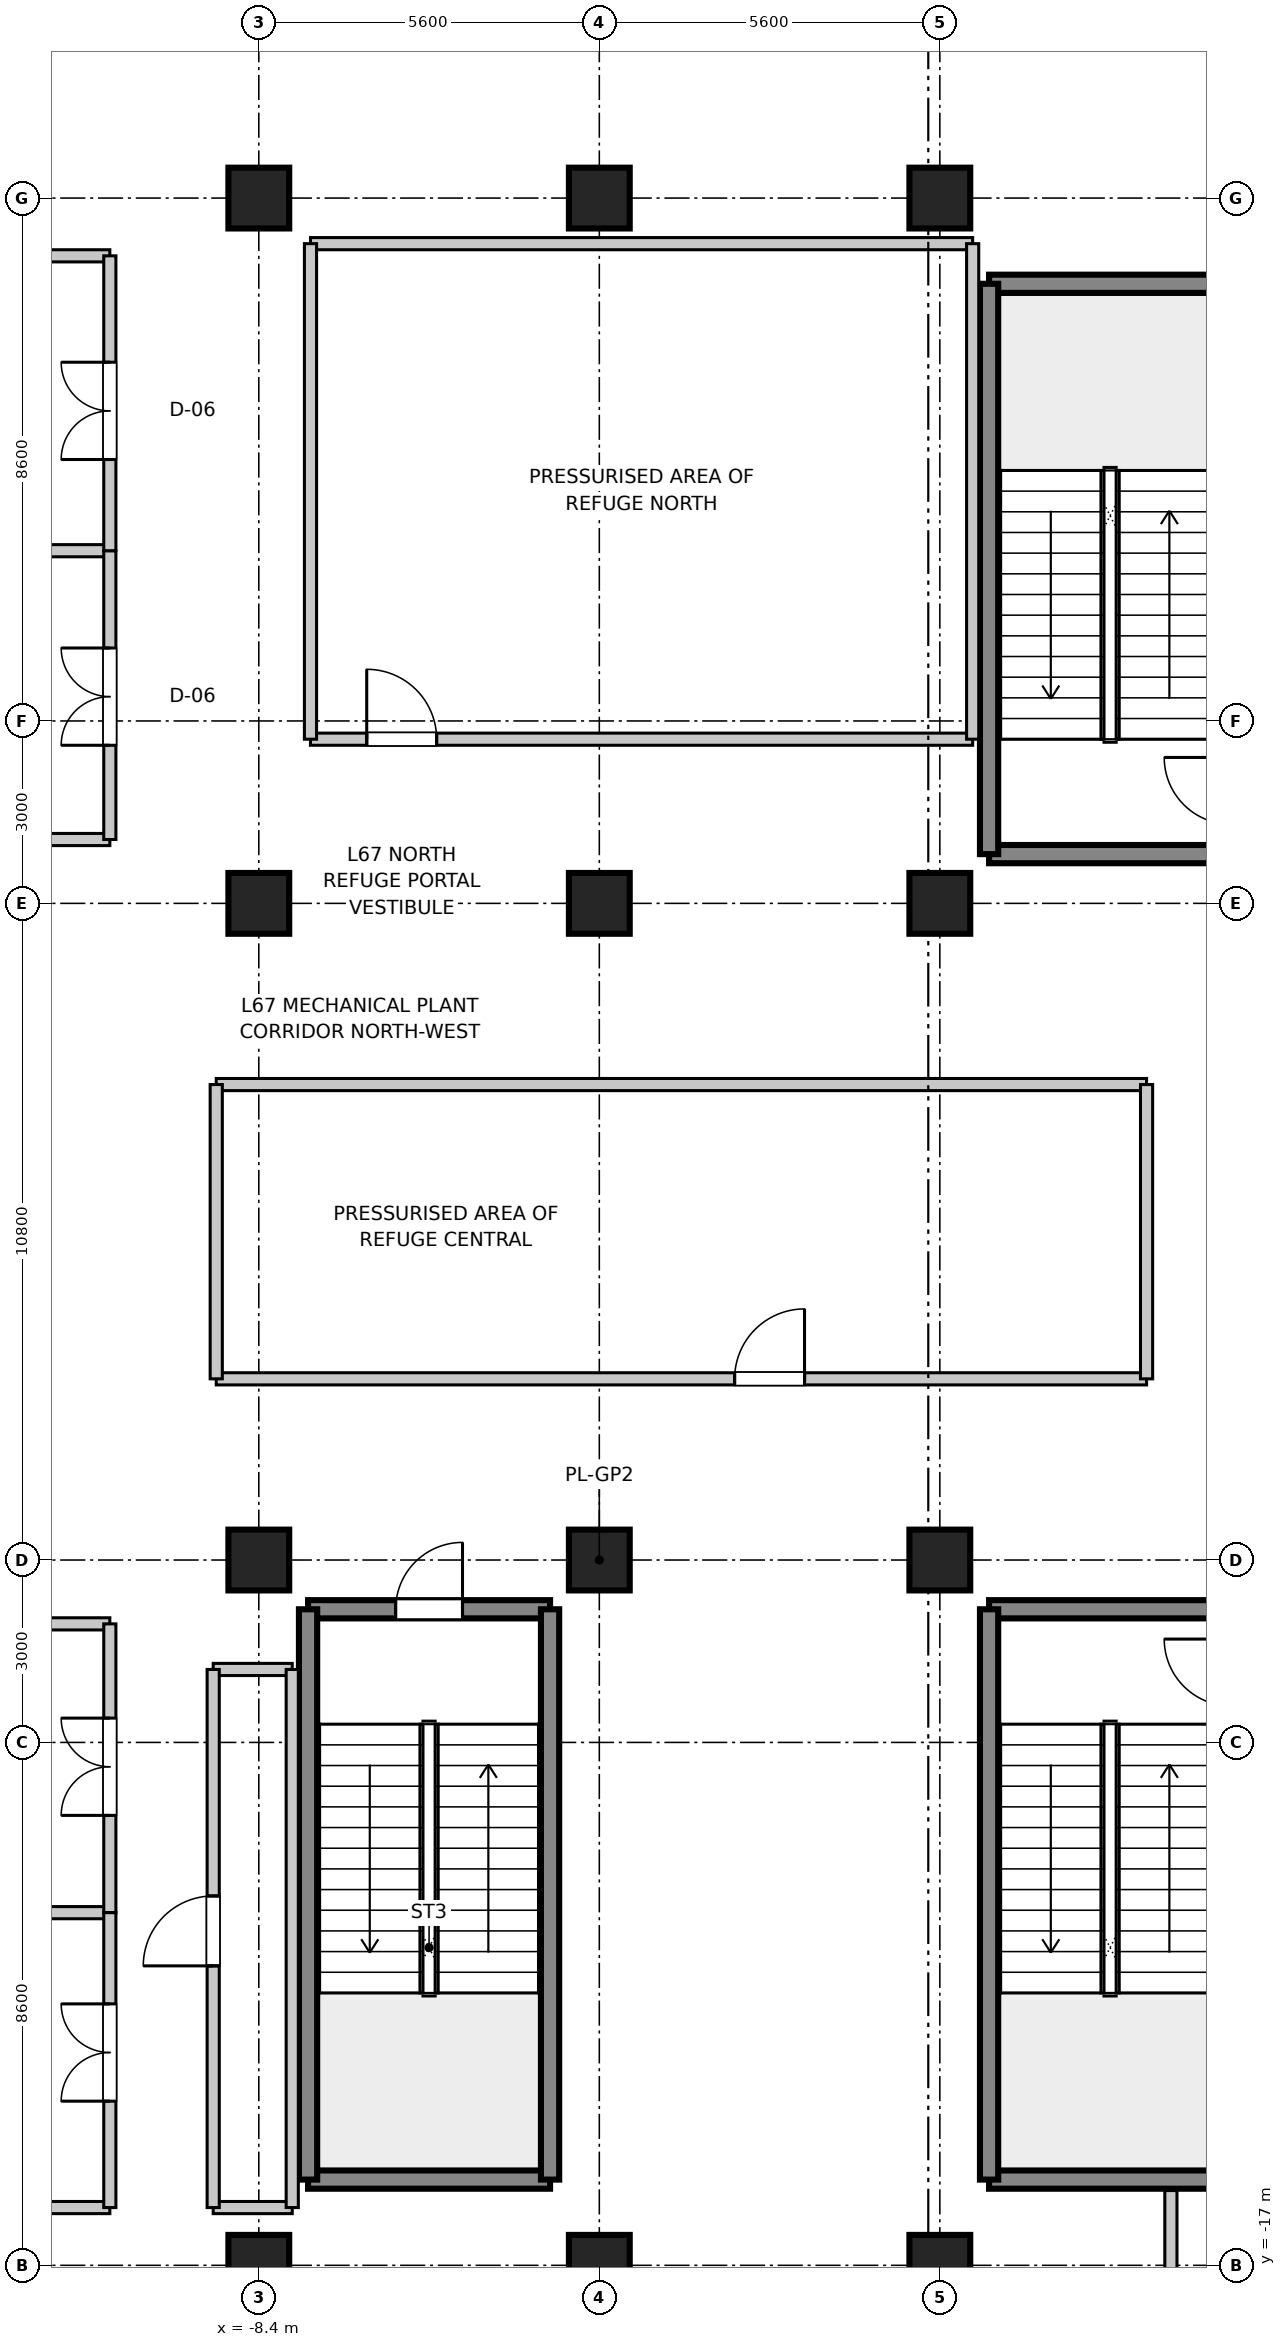
"""IFC4 building model, lengths in metres.
Left out: names, types, materials, properties, quantities, classifications, styles, units other than length and angle.
Written with IfcOpenShell. Run it as: python <this file> out.ifc"""

import sys

from ifc_helpers import new_model, si_unit, direction, frame, frame_2d, origin, origin_2d, place, context, subcontext, project, spatial, rectangle, extrude, source, transform, mapped, element, fill, save


model = new_model("IFC4")
c1 = context("Model", 3, precision=1e-05, world=origin(), true_north=direction((0.0, 1.0)))
c2 = subcontext(c1, "Body", "Model", "MODEL_VIEW")
j1 = project(units=[si_unit("LENGTHUNIT", "METRE"), si_unit("PLANEANGLEUNIT", "RADIAN")], contexts=[c1])
p1 = place(None, origin())
s1 = spatial("IfcSite", under=j1, at=p1, CompositionType="ELEMENT")
p2 = place(p1, origin())
s2 = spatial("IfcBuilding", under=s1, at=p2, CompositionType="ELEMENT")
p3 = place(p2, frame((0.0, 0.0, 261.5)))
s3 = spatial("IfcBuildingStorey", under=s2, at=p3, CompositionType="ELEMENT", Elevation=261.5)
m1 = source(origin(), c2, "Body", "SweptSolid", [
    extrude(rectangle(XDim=1.0, YDim=1.0, at=origin_2d()), origin(), (0.0, 0.0, 1.0), 4.755),
])
for number, where, z_axis, x_axis in (
    (1, (-8.4, -17.0, 0.0), (0.0, 0.0, 1.0), (1.0, 0.0, 0.0)),
    (2, (-8.4, -5.4, 0.0), (0.0, 0.0, 1.0), (1.0, 0.0, 0.0)),
    (3, (-8.4, 5.4, 0.0), (0.0, 0.0, 1.0), (1.0, 0.0, 0.0)),
    (4, (-8.4, 17.0, 0.0), (0.0, 0.0, 1.0), (1.0, 0.0, 0.0)),
    (5, (-2.8, -17.0, 0.0), (0.0, 0.0, 1.0), (1.0, 0.0, 0.0)),
    (6, (-2.8, -5.4, 0.0), (0.0, 0.0, 1.0), (1.0, 0.0, 0.0)),
    (7, (-2.8, 5.4, 0.0), (0.0, 0.0, 1.0), (1.0, 0.0, 0.0)),
    (8, (-2.8, 17.0, 0.0), (0.0, 0.0, 1.0), (1.0, 0.0, 0.0)),
    (9, (2.8, -17.0, 0.0), (0.0, 0.0, 1.0), (1.0, 0.0, 0.0)),
    (10, (2.8, -5.4, 0.0), (0.0, 0.0, 1.0), (1.0, 0.0, 0.0)),
    (11, (2.8, 5.4, 0.0), (0.0, 0.0, 1.0), (1.0, 0.0, 0.0)),
    (12, (2.8, 17.0, 0.0), (0.0, 0.0, 1.0), (1.0, 0.0, 0.0)),
):
    element("IfcColumn", number, at=place(p3, frame(where, z_axis=z_axis, x_axis=x_axis)), inside=s3, PredefinedType="COLUMN", context=c2, shape_type="MappedRepresentation", body=[
        mapped(m1, transform((0.0, 0.0, 0.0), scale=1.0)),
    ])
m2 = source(origin(), c2, "Body", "SweptSolid", [
    extrude(rectangle(XDim=3.98, YDim=0.3, at=frame_2d((1.99, 0.0))), origin(), (0.0, 0.0, 1.0), 4.5),
])
for number, where, z_axis, x_axis in (
    (13, (3.61, 6.21, 0.0), (0.0, 0.0, 1.0), (1.0, 0.0, 0.0)),
    (14, (3.61, 15.59, 0.0), (0.0, 0.0, 1.0), (1.0, 0.0, 0.0)),
):
    element("IfcWall", number, at=place(p3, frame(where, z_axis=z_axis, x_axis=x_axis)), inside=s3, PredefinedType="SHEAR", context=c2, shape_type="MappedRepresentation", body=[
        mapped(m2, transform((0.0, 0.0, 0.0), scale=1.0)),
    ])
m3 = source(origin(), c2, "Body", "SweptSolid", [
    extrude(rectangle(XDim=9.38, YDim=0.3, at=frame_2d((4.69, 0.0))), origin(), (0.0, 0.0, 1.0), 4.5),
])
p4 = place(p3, frame((3.61, 6.21, 0.0), z_axis=(0.0, 0.0, 1.0), x_axis=(0.0, 1.0, 0.0)))
e15 = element("IfcWall", 15, at=p4, inside=s3, PredefinedType="SHEAR", context=c2, shape_type="MappedRepresentation", body=[
    mapped(m3, transform((0.0, 0.0, 0.0), scale=1.0)),
])
for number, where, z_axis, x_axis in (
    (16, (3.61, -15.59, 0.0), (0.0, 0.0, 1.0), (1.0, 0.0, 0.0)),
    (17, (3.61, -6.21, 0.0), (0.0, 0.0, 1.0), (1.0, 0.0, 0.0)),
):
    element("IfcWall", number, at=place(p3, frame(where, z_axis=z_axis, x_axis=x_axis)), inside=s3, PredefinedType="SHEAR", context=c2, shape_type="MappedRepresentation", body=[
        mapped(m2, transform((0.0, 0.0, 0.0), scale=1.0)),
    ])
p5 = place(p3, frame((3.61, -15.59, 0.0), z_axis=(0.0, 0.0, 1.0), x_axis=(0.0, 1.0, 0.0)))
e18 = element("IfcWall", 18, at=p5, inside=s3, PredefinedType="SHEAR", context=c2, shape_type="MappedRepresentation", body=[
    mapped(m3, transform((0.0, 0.0, 0.0), scale=1.0)),
])
p6 = place(p3, frame((-7.59, -15.59, 0.0), z_axis=(0.0, 0.0, 1.0), x_axis=(1.0, 0.0, 0.0)))
e19 = element("IfcWall", 19, at=p6, inside=s3, PredefinedType="SHEAR", context=c2, shape_type="MappedRepresentation", body=[
    mapped(m2, transform((0.0, 0.0, 0.0), scale=1.0)),
])
p7 = place(p3, frame((-7.59, -6.21, 0.0), z_axis=(0.0, 0.0, 1.0), x_axis=(1.0, 0.0, 0.0)))
e20 = element("IfcWall", 20, at=p7, inside=s3, PredefinedType="SHEAR", context=c2, shape_type="MappedRepresentation", body=[
    mapped(m2, transform((0.0, 0.0, 0.0), scale=1.0)),
])
p8 = place(p7, frame((1.44, 0.0, 0.0)))
e21 = element("IfcOpeningElement", 21, at=p8, cuts=e20, PredefinedType="OPENING", context=c2, shape_type="SweptSolid", body=[
    extrude(rectangle(XDim=1.1, YDim=2.15, at=frame_2d((0.55, 1.075))), frame((0.0, 0.16, 0.0), z_axis=(0.0, -1.0, 0.0), x_axis=(1.0, 0.0, 0.0)), (0.0, 0.0, 1.0), 0.32),
])
for number, where, z_axis, x_axis in (
    (22, (-7.59, -15.59, 0.0), (0.0, 0.0, 1.0), (0.0, 1.0, 0.0)),
    (23, (-3.61, -15.59, 0.0), (0.0, 0.0, 1.0), (0.0, 1.0, 0.0)),
):
    element("IfcWall", number, at=place(p3, frame(where, z_axis=z_axis, x_axis=x_axis)), inside=s3, PredefinedType="SHEAR", context=c2, shape_type="MappedRepresentation", body=[
        mapped(m3, transform((0.0, 0.0, 0.0), scale=1.0)),
    ])
m4 = source(origin(), c2, "Body", "SweptSolid", [
    extrude(rectangle(XDim=4.03, YDim=0.2, at=frame_2d((2.015, 0.0))), origin(), (0.0, 0.0, 1.0), 3.4),
])
p9 = place(p3, frame((6.6, -19.8, 0.0), z_axis=(0.0, 0.0, 1.0), x_axis=(0.0, 1.0, 0.0)))
e24 = element("IfcWall", 24, at=p9, inside=s3, PredefinedType="PARTITIONING", context=c2, shape_type="MappedRepresentation", body=[
    mapped(m4, transform((0.0, 0.0, 0.0), scale=1.0)),
])
m5 = source(origin(), c2, "Body", "SweptSolid", [
    extrude(rectangle(XDim=10.89, YDim=0.2, at=frame_2d((5.445, 0.0))), origin(), (0.0, 0.0, 1.0), 3.4),
])
p10 = place(p3, frame((-7.55, 8.1, 0.0), z_axis=(0.0, 0.0, 1.0), x_axis=(1.0, 0.0, 0.0)))
e25 = element("IfcWall", 25, at=p10, inside=s3, PredefinedType="PARTITIONING", context=c2, shape_type="MappedRepresentation", body=[
    mapped(m5, transform((0.0, 0.0, 0.0), scale=1.0)),
])
p11 = place(p10, frame((0.925, 0.0, 0.0)))
e26 = element("IfcOpeningElement", 26, at=p11, cuts=e25, PredefinedType="OPENING", context=c2, shape_type="SweptSolid", body=[
    extrude(rectangle(XDim=1.15, YDim=2.15, at=frame_2d((0.575, 1.075))), frame((0.0, 0.11, 0.0), z_axis=(0.0, -1.0, 0.0), x_axis=(1.0, 0.0, 0.0)), (0.0, 0.0, 1.0), 0.22),
])
p12 = place(p3, frame((-7.55, 16.25, 0.0), z_axis=(0.0, 0.0, 1.0), x_axis=(1.0, 0.0, 0.0)))
e27 = element("IfcWall", 27, at=p12, inside=s3, PredefinedType="PARTITIONING", context=c2, shape_type="MappedRepresentation", body=[
    mapped(m5, transform((0.0, 0.0, 0.0), scale=1.0)),
])
m6 = source(origin(), c2, "Body", "SweptSolid", [
    extrude(rectangle(XDim=8.15, YDim=0.2, at=frame_2d((4.075, 0.0))), origin(), (0.0, 0.0, 1.0), 3.4),
])
for number, where, z_axis, x_axis in (
    (28, (-7.55, 8.1, 0.0), (0.0, 0.0, 1.0), (0.0, 1.0, 0.0)),
    (29, (3.34, 8.1, 0.0), (0.0, 0.0, 1.0), (0.0, 1.0, 0.0)),
):
    element("IfcWall", number, at=place(p3, frame(where, z_axis=z_axis, x_axis=x_axis)), inside=s3, PredefinedType="PARTITIONING", context=c2, shape_type="MappedRepresentation", body=[
        mapped(m6, transform((0.0, 0.0, 0.0), scale=1.0)),
    ])
m7 = source(origin(), c2, "Body", "SweptSolid", [
    extrude(rectangle(XDim=15.3, YDim=0.2, at=frame_2d((7.65, 0.0))), origin(), (0.0, 0.0, 1.0), 3.4),
])
p13 = place(p3, frame((-9.1, -2.42, 0.0), z_axis=(0.0, 0.0, 1.0), x_axis=(1.0, 0.0, 0.0)))
e30 = element("IfcWall", 30, at=p13, inside=s3, PredefinedType="PARTITIONING", context=c2, shape_type="MappedRepresentation", body=[
    mapped(m7, transform((0.0, 0.0, 0.0), scale=1.0)),
])
p14 = place(p13, frame((8.525, 0.0, 0.0)))
e31 = element("IfcOpeningElement", 31, at=p14, cuts=e30, PredefinedType="OPENING", context=c2, shape_type="SweptSolid", body=[
    extrude(rectangle(XDim=1.15, YDim=2.15, at=frame_2d((0.575, 1.075))), frame((0.0, 0.11, 0.0), z_axis=(0.0, -1.0, 0.0), x_axis=(1.0, 0.0, 0.0)), (0.0, 0.0, 1.0), 0.22),
])
p15 = place(p3, frame((-9.1, 2.42, 0.0), z_axis=(0.0, 0.0, 1.0), x_axis=(1.0, 0.0, 0.0)))
e32 = element("IfcWall", 32, at=p15, inside=s3, PredefinedType="PARTITIONING", context=c2, shape_type="MappedRepresentation", body=[
    mapped(m7, transform((0.0, 0.0, 0.0), scale=1.0)),
])
m8 = source(origin(), c2, "Body", "SweptSolid", [
    extrude(rectangle(XDim=4.84, YDim=0.2, at=frame_2d((2.42, 0.0))), origin(), (0.0, 0.0, 1.0), 3.4),
])
for number, where, z_axis, x_axis in (
    (33, (-9.1, -2.42, 0.0), (0.0, 0.0, 1.0), (0.0, 1.0, 0.0)),
    (34, (6.2, -2.42, 0.0), (0.0, 0.0, 1.0), (0.0, 1.0, 0.0)),
):
    element("IfcWall", number, at=place(p3, frame(where, z_axis=z_axis, x_axis=x_axis)), inside=s3, PredefinedType="PARTITIONING", context=c2, shape_type="MappedRepresentation", body=[
        mapped(m8, transform((0.0, 0.0, 0.0), scale=1.0)),
    ])
m9 = source(origin(), c2, "Body", "SweptSolid", [
    extrude(rectangle(XDim=1.3, YDim=0.2, at=frame_2d((0.65, 0.0))), origin(), (0.0, 0.0, 1.0), 3.4),
])
for number, where, z_axis, x_axis in (
    (35, (-9.15, -16.05, 0.0), (0.0, 0.0, 1.0), (1.0, 0.0, 0.0)),
    (36, (-9.15, -7.2, 0.0), (0.0, 0.0, 1.0), (1.0, 0.0, 0.0)),
):
    element("IfcWall", number, at=place(p3, frame(where, z_axis=z_axis, x_axis=x_axis)), inside=s3, PredefinedType="PARTITIONING", context=c2, shape_type="MappedRepresentation", body=[
        mapped(m9, transform((0.0, 0.0, 0.0), scale=1.0)),
    ])
m10 = source(origin(), c2, "Body", "SweptSolid", [
    extrude(rectangle(XDim=8.85, YDim=0.2, at=frame_2d((4.425, 0.0))), origin(), (0.0, 0.0, 1.0), 3.4),
])
p16 = place(p3, frame((-9.15, -16.05, 0.0), z_axis=(0.0, 0.0, 1.0), x_axis=(0.0, 1.0, 0.0)))
e37 = element("IfcWall", 37, at=p16, inside=s3, PredefinedType="PARTITIONING", context=c2, shape_type="MappedRepresentation", body=[
    mapped(m10, transform((0.0, 0.0, 0.0), scale=1.0)),
])
p17 = place(p16, frame((3.975, 0.0, 0.0)))
e38 = element("IfcOpeningElement", 38, at=p17, cuts=e37, PredefinedType="OPENING", context=c2, shape_type="SweptSolid", body=[
    extrude(rectangle(XDim=1.15, YDim=2.15, at=frame_2d((0.575, 1.075))), frame((0.0, 0.11, 0.0), z_axis=(0.0, -1.0, 0.0), x_axis=(1.0, 0.0, 0.0)), (0.0, 0.0, 1.0), 0.22),
])
p18 = place(p3, frame((-7.85, -16.05, 0.0), z_axis=(0.0, 0.0, 1.0), x_axis=(0.0, 1.0, 0.0)))
e39 = element("IfcWall", 39, at=p18, inside=s3, PredefinedType="PARTITIONING", context=c2, shape_type="MappedRepresentation", body=[
    mapped(m10, transform((0.0, 0.0, 0.0), scale=1.0)),
])
m11 = source(origin(), c2, "Body", "SweptSolid", [
    extrude(rectangle(XDim=12.07, YDim=0.2, at=frame_2d((6.035, 0.0))), origin(), (0.0, 0.0, 1.0), 3.4),
])
for number, where, z_axis, x_axis in (
    (40, (-22.92, 6.45, 0.0), (0.0, 0.0, 1.0), (1.0, 0.0, 0.0)),
    (41, (-22.92, 11.2, 0.0), (0.0, 0.0, 1.0), (1.0, 0.0, 0.0)),
):
    element("IfcWall", number, at=place(p3, frame(where, z_axis=z_axis, x_axis=x_axis)), inside=s3, PredefinedType="PARTITIONING", context=c2, shape_type="MappedRepresentation", body=[
        mapped(m11, transform((0.0, 0.0, 0.0), scale=1.0)),
    ])
m12 = source(origin(), c2, "Body", "SweptSolid", [
    extrude(rectangle(XDim=4.75, YDim=0.2, at=frame_2d((2.375, 0.0))), origin(), (0.0, 0.0, 1.0), 3.4),
])
p19 = place(p3, frame((-10.85, 6.45, 0.0), z_axis=(0.0, 0.0, 1.0), x_axis=(0.0, 1.0, 0.0)))
e42 = element("IfcWall", 42, at=p19, inside=s3, PredefinedType="PARTITIONING", context=c2, shape_type="MappedRepresentation", body=[
    mapped(m12, transform((0.0, 0.0, 0.0), scale=1.0)),
])
p20 = place(p19, frame((1.55, 0.0, 0.0)))
e43 = element("IfcOpeningElement", 43, at=p20, cuts=e42, PredefinedType="OPENING", context=c2, shape_type="SweptSolid", body=[
    extrude(rectangle(XDim=1.6, YDim=2.15, at=frame_2d((0.8, 1.075))), frame((0.0, 0.11, 0.0), z_axis=(0.0, -1.0, 0.0), x_axis=(1.0, 0.0, 0.0)), (0.0, 0.0, 1.0), 0.22),
])
p21 = place(p3, frame((-22.92, 16.05, 0.0), z_axis=(0.0, 0.0, 1.0), x_axis=(1.0, 0.0, 0.0)))
e44 = element("IfcWall", 44, at=p21, inside=s3, PredefinedType="PARTITIONING", context=c2, shape_type="MappedRepresentation", body=[
    mapped(m11, transform((0.0, 0.0, 0.0), scale=1.0)),
])
m13 = source(origin(), c2, "Body", "SweptSolid", [
    extrude(rectangle(XDim=4.85, YDim=0.2, at=frame_2d((2.425, 0.0))), origin(), (0.0, 0.0, 1.0), 3.4),
])
p22 = place(p3, frame((-10.85, 11.2, 0.0), z_axis=(0.0, 0.0, 1.0), x_axis=(0.0, 1.0, 0.0)))
e45 = element("IfcWall", 45, at=p22, inside=s3, PredefinedType="PARTITIONING", context=c2, shape_type="MappedRepresentation", body=[
    mapped(m13, transform((0.0, 0.0, 0.0), scale=1.0)),
])
p23 = place(p22, frame((1.5, 0.0, 0.0)))
e46 = element("IfcOpeningElement", 46, at=p23, cuts=e45, PredefinedType="OPENING", context=c2, shape_type="SweptSolid", body=[
    extrude(rectangle(XDim=1.6, YDim=2.15, at=frame_2d((0.8, 1.075))), frame((0.0, 0.11, 0.0), z_axis=(0.0, -1.0, 0.0), x_axis=(1.0, 0.0, 0.0)), (0.0, 0.0, 1.0), 0.22),
])
for number, where, z_axis, x_axis in (
    (47, (-22.92, -11.2, 0.0), (0.0, 0.0, 1.0), (1.0, 0.0, 0.0)),
    (48, (-22.92, -6.45, 0.0), (0.0, 0.0, 1.0), (1.0, 0.0, 0.0)),
):
    element("IfcWall", number, at=place(p3, frame(where, z_axis=z_axis, x_axis=x_axis)), inside=s3, PredefinedType="PARTITIONING", context=c2, shape_type="MappedRepresentation", body=[
        mapped(m11, transform((0.0, 0.0, 0.0), scale=1.0)),
    ])
p24 = place(p3, frame((-10.85, -11.2, 0.0), z_axis=(0.0, 0.0, 1.0), x_axis=(0.0, 1.0, 0.0)))
e49 = element("IfcWall", 49, at=p24, inside=s3, PredefinedType="PARTITIONING", context=c2, shape_type="MappedRepresentation", body=[
    mapped(m12, transform((0.0, 0.0, 0.0), scale=1.0)),
])
p25 = place(p24, frame((1.6, 0.0, 0.0)))
e50 = element("IfcOpeningElement", 50, at=p25, cuts=e49, PredefinedType="OPENING", context=c2, shape_type="SweptSolid", body=[
    extrude(rectangle(XDim=1.6, YDim=2.15, at=frame_2d((0.8, 1.075))), frame((0.0, 0.11, 0.0), z_axis=(0.0, -1.0, 0.0), x_axis=(1.0, 0.0, 0.0)), (0.0, 0.0, 1.0), 0.22),
])
p26 = place(p3, frame((-22.92, -16.05, 0.0), z_axis=(0.0, 0.0, 1.0), x_axis=(1.0, 0.0, 0.0)))
e51 = element("IfcWall", 51, at=p26, inside=s3, PredefinedType="PARTITIONING", context=c2, shape_type="MappedRepresentation", body=[
    mapped(m11, transform((0.0, 0.0, 0.0), scale=1.0)),
])
p27 = place(p3, frame((-10.85, -16.05, 0.0), z_axis=(0.0, 0.0, 1.0), x_axis=(0.0, 1.0, 0.0)))
e52 = element("IfcWall", 52, at=p27, inside=s3, PredefinedType="PARTITIONING", context=c2, shape_type="MappedRepresentation", body=[
    mapped(m13, transform((0.0, 0.0, 0.0), scale=1.0)),
])
p28 = place(p27, frame((1.75, 0.0, 0.0)))
e53 = element("IfcOpeningElement", 53, at=p28, cuts=e52, PredefinedType="OPENING", context=c2, shape_type="SweptSolid", body=[
    extrude(rectangle(XDim=1.6, YDim=2.15, at=frame_2d((0.8, 1.075))), frame((0.0, 0.11, 0.0), z_axis=(0.0, -1.0, 0.0), x_axis=(1.0, 0.0, 0.0)), (0.0, 0.0, 1.0), 0.22),
])
m14 = source(origin(), c2, "Body", "SweptSolid", [
    extrude(rectangle(XDim=1.1, YDim=2.15, at=frame_2d((0.55, 1.075))), frame((0.0, 0.025, 0.0), z_axis=(0.0, -1.0, 0.0), x_axis=(1.0, 0.0, 0.0)), (0.0, 0.0, 1.0), 0.05),
])
p29 = place(p8, frame((1.1, 0.0, 0.0), z_axis=(0.0, 0.0, 1.0), x_axis=(-1.0, 0.0, 0.0)))
e54 = element("IfcDoor", 54, at=p29, inside=s3, OperationType="SINGLE_SWING_RIGHT", PredefinedType="DOOR", context=c2, shape_type="MappedRepresentation", body=[
    mapped(m14, transform((0.0, 0.0, 0.0), scale=1.0)),
])
fill(e21, e54)
m15 = source(origin(), c2, "Body", "SweptSolid", [
    extrude(rectangle(XDim=1.15, YDim=2.15, at=frame_2d((0.575, 1.075))), frame((0.0, 0.025, 0.0), z_axis=(0.0, -1.0, 0.0), x_axis=(1.0, 0.0, 0.0)), (0.0, 0.0, 1.0), 0.05),
])
p30 = place(p11, origin())
e55 = element("IfcDoor", 55, at=p30, inside=s3, OperationType="SINGLE_SWING_LEFT", PredefinedType="DOOR", context=c2, shape_type="MappedRepresentation", body=[
    mapped(m15, transform((0.0, 0.0, 0.0), scale=1.0)),
])
fill(e26, e55)
p31 = place(p14, origin())
e56 = element("IfcDoor", 56, at=p31, inside=s3, OperationType="SINGLE_SWING_RIGHT", PredefinedType="DOOR", context=c2, shape_type="MappedRepresentation", body=[
    mapped(m15, transform((0.0, 0.0, 0.0), scale=1.0)),
])
fill(e31, e56)
p32 = place(p17, frame((1.15, 0.0, 0.0), z_axis=(0.0, 0.0, 1.0), x_axis=(-1.0, 0.0, 0.0)))
e57 = element("IfcDoor", 57, at=p32, inside=s3, OperationType="SINGLE_SWING_LEFT", PredefinedType="DOOR", context=c2, shape_type="MappedRepresentation", body=[
    mapped(m15, transform((0.0, 0.0, 0.0), scale=1.0)),
])
fill(e38, e57)
m16 = source(origin(), c2, "Body", "SweptSolid", [
    extrude(rectangle(XDim=1.6, YDim=2.15, at=frame_2d((0.8, 1.075))), frame((0.0, 0.025, 0.0), z_axis=(0.0, -1.0, 0.0), x_axis=(1.0, 0.0, 0.0)), (0.0, 0.0, 1.0), 0.05),
])
p33 = place(p20, origin())
e58 = element("IfcDoor", 58, at=p33, inside=s3, OperationType="DOUBLE_DOOR_SINGLE_SWING", PredefinedType="DOOR", context=c2, shape_type="MappedRepresentation", body=[
    mapped(m16, transform((0.0, 0.0, 0.0), scale=1.0)),
])
fill(e43, e58)
p34 = place(p23, origin())
e59 = element("IfcDoor", 59, at=p34, inside=s3, OperationType="DOUBLE_DOOR_SINGLE_SWING", PredefinedType="DOOR", context=c2, shape_type="MappedRepresentation", body=[
    mapped(m16, transform((0.0, 0.0, 0.0), scale=1.0)),
])
fill(e46, e59)
p35 = place(p25, origin())
e60 = element("IfcDoor", 60, at=p35, inside=s3, OperationType="DOUBLE_DOOR_SINGLE_SWING", PredefinedType="DOOR", context=c2, shape_type="MappedRepresentation", body=[
    mapped(m16, transform((0.0, 0.0, 0.0), scale=1.0)),
])
fill(e50, e60)
p36 = place(p28, origin())
e61 = element("IfcDoor", 61, at=p36, inside=s3, OperationType="DOUBLE_DOOR_SINGLE_SWING", PredefinedType="DOOR", context=c2, shape_type="MappedRepresentation", body=[
    mapped(m16, transform((0.0, 0.0, 0.0), scale=1.0)),
])
fill(e53, e61)
save(model, sys.argv[1])
